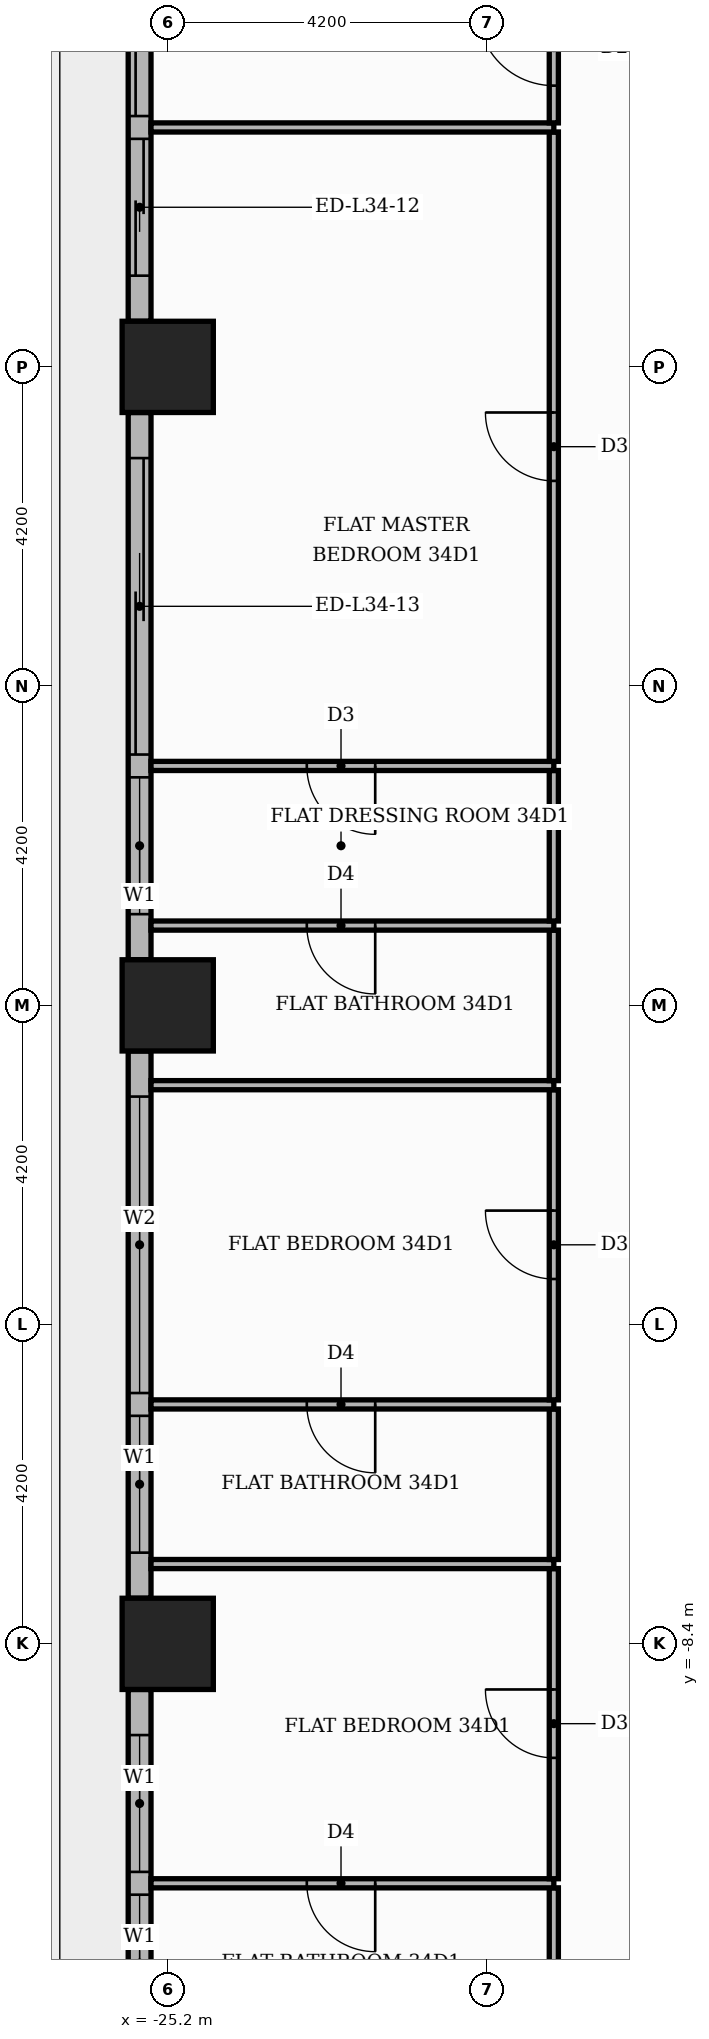
"""IFC4 building model, lengths in metres.
Left out: names, types, materials, properties, quantities, classifications, styles, units other than length and angle.
Written with IfcOpenShell. Run it as: python <this file> out.ifc"""

import sys

from ifc_helpers import new_model, si_unit, direction, frame, frame_2d, origin, origin_2d, place, context, subcontext, project, spatial, rectangle, extrude, element, fill, save


model = new_model("IFC4")
c1 = context("Model", 3, precision=1e-05, world=origin(), true_north=direction((0.0, 1.0)))
c2 = subcontext(c1, "Body", "Model", "MODEL_VIEW")
j1 = project(units=[si_unit("LENGTHUNIT", "METRE"), si_unit("PLANEANGLEUNIT", "RADIAN")], contexts=[c1])
p1 = place(None, origin())
s1 = spatial("IfcSite", under=j1, at=p1, CompositionType="ELEMENT")
p2 = place(p1, origin())
s2 = spatial("IfcBuilding", under=s1, at=p2, CompositionType="ELEMENT")
p3 = place(p2, frame((0.0, 0.0, 145.5)))
s3 = spatial("IfcBuildingStorey", under=s2, at=p3, CompositionType="ELEMENT", Elevation=145.5)
for number, where, z_axis, x_axis in (
    (1, (-25.2, 0.0, 0.0), (0.0, 0.0, 1.0), (1.0, 0.0, 0.0)),
    (2, (-25.2, -8.4, 0.0), (0.0, 0.0, 1.0), (1.0, 0.0, 0.0)),
    (3, (-25.2, 8.4, 0.0), (0.0, 0.0, 1.0), (1.0, 0.0, 0.0)),
):
    element("IfcColumn", number, at=place(p3, frame(where, z_axis=z_axis, x_axis=x_axis)), inside=s3, PredefinedType="COLUMN", context=c2, shape_type="SweptSolid", body=[
        extrude(rectangle(XDim=1.2, YDim=1.2, at=origin_2d()), origin(), (0.0, 0.0, 1.0), 3.9),
    ])
p4 = place(p3, frame((-25.57, 16.2, 0.0), z_axis=(0.0, 0.0, 1.0), x_axis=(0.0, -1.0, 0.0)))
e4 = element("IfcWall", 4, at=p4, inside=s3, PredefinedType="STANDARD", context=c2, shape_type="SweptSolid", body=[
    extrude(rectangle(XDim=7.2, YDim=0.3, at=frame_2d((3.6, 0.0))), origin(), (0.0, 0.0, 1.0), 3.48),
])
p5 = place(p4, frame((0.6, 0.0, 0.0)))
e5 = element("IfcOpeningElement", 5, at=p5, cuts=e4, PredefinedType="OPENING", context=c2, shape_type="SweptSolid", body=[
    extrude(rectangle(XDim=3.9, YDim=2.4, at=frame_2d((1.95, 1.2))), frame((0.0, 0.16, 0.0), z_axis=(0.0, -1.0, 0.0), x_axis=(1.0, 0.0, 0.0)), (0.0, 0.0, 1.0), 0.32),
])
p6 = place(p4, frame((4.8, 0.0, 0.0)))
e6 = element("IfcOpeningElement", 6, at=p6, cuts=e4, PredefinedType="OPENING", context=c2, shape_type="SweptSolid", body=[
    extrude(rectangle(XDim=1.8, YDim=2.4, at=frame_2d((0.9, 1.2))), frame((0.0, 0.16, 0.0), z_axis=(0.0, -1.0, 0.0), x_axis=(1.0, 0.0, 0.0)), (0.0, 0.0, 1.0), 0.32),
])
p7 = place(p3, frame((-25.57, 7.8, 0.0), z_axis=(0.0, 0.0, 1.0), x_axis=(0.0, -1.0, 0.0)))
e7 = element("IfcWall", 7, at=p7, inside=s3, PredefinedType="STANDARD", context=c2, shape_type="SweptSolid", body=[
    extrude(rectangle(XDim=7.2, YDim=0.3, at=frame_2d((3.6, 0.0))), origin(), (0.0, 0.0, 1.0), 3.48),
])
p8 = place(p7, frame((0.6, 0.0, 0.0)))
e8 = element("IfcOpeningElement", 8, at=p8, cuts=e7, PredefinedType="OPENING", context=c2, shape_type="SweptSolid", body=[
    extrude(rectangle(XDim=3.9, YDim=2.4, at=frame_2d((1.95, 1.2))), frame((0.0, 0.16, 0.0), z_axis=(0.0, -1.0, 0.0), x_axis=(1.0, 0.0, 0.0)), (0.0, 0.0, 1.0), 0.32),
])
p9 = place(p7, frame((4.8, 0.0, 0.9)))
e9 = element("IfcOpeningElement", 9, at=p9, cuts=e7, PredefinedType="OPENING", context=c2, shape_type="SweptSolid", body=[
    extrude(rectangle(XDim=1.8, YDim=2.1, at=frame_2d((0.9, 1.05))), frame((0.0, 0.16, 0.0), z_axis=(0.0, -1.0, 0.0), x_axis=(1.0, 0.0, 0.0)), (0.0, 0.0, 1.0), 0.32),
])
p10 = place(p3, frame((-25.57, -0.6, 0.0), z_axis=(0.0, 0.0, 1.0), x_axis=(0.0, -1.0, 0.0)))
e10 = element("IfcWall", 10, at=p10, inside=s3, PredefinedType="STANDARD", context=c2, shape_type="SweptSolid", body=[
    extrude(rectangle(XDim=7.2, YDim=0.3, at=frame_2d((3.6, 0.0))), origin(), (0.0, 0.0, 1.0), 3.48),
])
p11 = place(p10, frame((0.6, 0.0, 0.9)))
e11 = element("IfcOpeningElement", 11, at=p11, cuts=e10, PredefinedType="OPENING", context=c2, shape_type="SweptSolid", body=[
    extrude(rectangle(XDim=3.9, YDim=2.1, at=frame_2d((1.95, 1.05))), frame((0.0, 0.16, 0.0), z_axis=(0.0, -1.0, 0.0), x_axis=(1.0, 0.0, 0.0)), (0.0, 0.0, 1.0), 0.32),
])
p12 = place(p10, frame((4.8, 0.0, 0.9)))
e12 = element("IfcOpeningElement", 12, at=p12, cuts=e10, PredefinedType="OPENING", context=c2, shape_type="SweptSolid", body=[
    extrude(rectangle(XDim=1.8, YDim=2.1, at=frame_2d((0.9, 1.05))), frame((0.0, 0.16, 0.0), z_axis=(0.0, -1.0, 0.0), x_axis=(1.0, 0.0, 0.0)), (0.0, 0.0, 1.0), 0.32),
])
p13 = place(p3, frame((-25.57, -9.0, 0.0), z_axis=(0.0, 0.0, 1.0), x_axis=(0.0, -1.0, 0.0)))
e13 = element("IfcWall", 13, at=p13, inside=s3, PredefinedType="STANDARD", context=c2, shape_type="SweptSolid", body=[
    extrude(rectangle(XDim=7.2, YDim=0.3, at=frame_2d((3.6, 0.0))), origin(), (0.0, 0.0, 1.0), 3.48),
])
p14 = place(p13, frame((0.6, 0.0, 0.9)))
e14 = element("IfcOpeningElement", 14, at=p14, cuts=e13, PredefinedType="OPENING", context=c2, shape_type="SweptSolid", body=[
    extrude(rectangle(XDim=1.8, YDim=2.1, at=frame_2d((0.9, 1.05))), frame((0.0, 0.16, 0.0), z_axis=(0.0, -1.0, 0.0), x_axis=(1.0, 0.0, 0.0)), (0.0, 0.0, 1.0), 0.32),
])
p15 = place(p13, frame((2.7, 0.0, 0.9)))
e15 = element("IfcOpeningElement", 15, at=p15, cuts=e13, PredefinedType="OPENING", context=c2, shape_type="SweptSolid", body=[
    extrude(rectangle(XDim=1.8, YDim=2.1, at=frame_2d((0.9, 1.05))), frame((0.0, 0.16, 0.0), z_axis=(0.0, -1.0, 0.0), x_axis=(1.0, 0.0, 0.0)), (0.0, 0.0, 1.0), 0.32),
])
p16 = place(p13, frame((4.8, 0.0, 0.9)))
e16 = element("IfcOpeningElement", 16, at=p16, cuts=e13, PredefinedType="OPENING", context=c2, shape_type="SweptSolid", body=[
    extrude(rectangle(XDim=1.8, YDim=2.1, at=frame_2d((0.9, 1.05))), frame((0.0, 0.16, 0.0), z_axis=(0.0, -1.0, 0.0), x_axis=(1.0, 0.0, 0.0)), (0.0, 0.0, 1.0), 0.32),
])
p17 = place(p3, frame((-20.12, -13.55, 0.0), z_axis=(0.0, 0.0, 1.0), x_axis=(0.0, 1.0, 0.0)))
e17 = element("IfcWall", 17, at=p17, inside=s3, PredefinedType="PARTITIONING", context=c2, shape_type="SweptSolid", body=[
    extrude(rectangle(XDim=1.94, YDim=0.12, at=frame_2d((0.97, 0.0))), origin(), (0.0, 0.0, 1.0), 3.48),
])
p18 = place(p3, frame((-25.42, -11.55, 0.0), z_axis=(0.0, 0.0, 1.0), x_axis=(1.0, 0.0, 0.0)))
e18 = element("IfcWall", 18, at=p18, inside=s3, PredefinedType="PARTITIONING", context=c2, shape_type="SweptSolid", body=[
    extrude(rectangle(XDim=5.3, YDim=0.12, at=frame_2d((2.65, 0.0))), origin(), (0.0, 0.0, 1.0), 3.48),
])
p19 = place(p18, frame((2.05, 0.0, 0.0)))
e19 = element("IfcOpeningElement", 19, at=p19, cuts=e18, PredefinedType="OPENING", context=c2, shape_type="SweptSolid", body=[
    extrude(rectangle(XDim=0.9, YDim=2.1, at=frame_2d((0.45, 1.05))), frame((0.0, 0.07, 0.0), z_axis=(0.0, -1.0, 0.0), x_axis=(1.0, 0.0, 0.0)), (0.0, 0.0, 1.0), 0.14),
])
p20 = place(p3, frame((-20.12, -11.49, 0.0), z_axis=(0.0, 0.0, 1.0), x_axis=(0.0, 1.0, 0.0)))
e20 = element("IfcWall", 20, at=p20, inside=s3, PredefinedType="PARTITIONING", context=c2, shape_type="SweptSolid", body=[
    extrude(rectangle(XDim=4.08, YDim=0.12, at=frame_2d((2.04, 0.0))), origin(), (0.0, 0.0, 1.0), 3.48),
])
p21 = place(p20, frame((1.59, 0.0, 0.0)))
e21 = element("IfcOpeningElement", 21, at=p21, cuts=e20, PredefinedType="OPENING", context=c2, shape_type="SweptSolid", body=[
    extrude(rectangle(XDim=0.9, YDim=2.1, at=frame_2d((0.45, 1.05))), frame((0.0, 0.07, 0.0), z_axis=(0.0, -1.0, 0.0), x_axis=(1.0, 0.0, 0.0)), (0.0, 0.0, 1.0), 0.14),
])
p22 = place(p3, frame((-25.42, -7.35, 0.0), z_axis=(0.0, 0.0, 1.0), x_axis=(1.0, 0.0, 0.0)))
e22 = element("IfcWall", 22, at=p22, inside=s3, PredefinedType="PARTITIONING", context=c2, shape_type="SweptSolid", body=[
    extrude(rectangle(XDim=5.3, YDim=0.12, at=frame_2d((2.65, 0.0))), origin(), (0.0, 0.0, 1.0), 3.48),
])
p23 = place(p3, frame((-20.12, -7.29, 0.0), z_axis=(0.0, 0.0, 1.0), x_axis=(0.0, 1.0, 0.0)))
e23 = element("IfcWall", 23, at=p23, inside=s3, PredefinedType="PARTITIONING", context=c2, shape_type="SweptSolid", body=[
    extrude(rectangle(XDim=1.98, YDim=0.12, at=frame_2d((0.99, 0.0))), origin(), (0.0, 0.0, 1.0), 3.48),
])
p24 = place(p3, frame((-25.42, -5.25, 0.0), z_axis=(0.0, 0.0, 1.0), x_axis=(1.0, 0.0, 0.0)))
e24 = element("IfcWall", 24, at=p24, inside=s3, PredefinedType="PARTITIONING", context=c2, shape_type="SweptSolid", body=[
    extrude(rectangle(XDim=5.3, YDim=0.12, at=frame_2d((2.65, 0.0))), origin(), (0.0, 0.0, 1.0), 3.48),
])
p25 = place(p24, frame((2.05, 0.0, 0.0)))
e25 = element("IfcOpeningElement", 25, at=p25, cuts=e24, PredefinedType="OPENING", context=c2, shape_type="SweptSolid", body=[
    extrude(rectangle(XDim=0.9, YDim=2.1, at=frame_2d((0.45, 1.05))), frame((0.0, 0.07, 0.0), z_axis=(0.0, -1.0, 0.0), x_axis=(1.0, 0.0, 0.0)), (0.0, 0.0, 1.0), 0.14),
])
p26 = place(p3, frame((-20.12, -5.19, 0.0), z_axis=(0.0, 0.0, 1.0), x_axis=(0.0, 1.0, 0.0)))
e26 = element("IfcWall", 26, at=p26, inside=s3, PredefinedType="PARTITIONING", context=c2, shape_type="SweptSolid", body=[
    extrude(rectangle(XDim=4.08, YDim=0.12, at=frame_2d((2.04, 0.0))), origin(), (0.0, 0.0, 1.0), 3.48),
])
p27 = place(p26, frame((1.59, 0.0, 0.0)))
e27 = element("IfcOpeningElement", 27, at=p27, cuts=e26, PredefinedType="OPENING", context=c2, shape_type="SweptSolid", body=[
    extrude(rectangle(XDim=0.9, YDim=2.1, at=frame_2d((0.45, 1.05))), frame((0.0, 0.07, 0.0), z_axis=(0.0, -1.0, 0.0), x_axis=(1.0, 0.0, 0.0)), (0.0, 0.0, 1.0), 0.14),
])
p28 = place(p3, frame((-25.42, -1.05, 0.0), z_axis=(0.0, 0.0, 1.0), x_axis=(1.0, 0.0, 0.0)))
e28 = element("IfcWall", 28, at=p28, inside=s3, PredefinedType="PARTITIONING", context=c2, shape_type="SweptSolid", body=[
    extrude(rectangle(XDim=5.3, YDim=0.12, at=frame_2d((2.65, 0.0))), origin(), (0.0, 0.0, 1.0), 3.48),
])
p29 = place(p3, frame((-20.12, -0.99, 0.0), z_axis=(0.0, 0.0, 1.0), x_axis=(0.0, 1.0, 0.0)))
e29 = element("IfcWall", 29, at=p29, inside=s3, PredefinedType="PARTITIONING", context=c2, shape_type="SweptSolid", body=[
    extrude(rectangle(XDim=1.98, YDim=0.12, at=frame_2d((0.99, 0.0))), origin(), (0.0, 0.0, 1.0), 3.48),
])
p30 = place(p3, frame((-25.42, 1.05, 0.0), z_axis=(0.0, 0.0, 1.0), x_axis=(1.0, 0.0, 0.0)))
e30 = element("IfcWall", 30, at=p30, inside=s3, PredefinedType="PARTITIONING", context=c2, shape_type="SweptSolid", body=[
    extrude(rectangle(XDim=5.3, YDim=0.12, at=frame_2d((2.65, 0.0))), origin(), (0.0, 0.0, 1.0), 3.48),
])
p31 = place(p30, frame((2.05, 0.0, 0.0)))
e31 = element("IfcOpeningElement", 31, at=p31, cuts=e30, PredefinedType="OPENING", context=c2, shape_type="SweptSolid", body=[
    extrude(rectangle(XDim=0.9, YDim=2.1, at=frame_2d((0.45, 1.05))), frame((0.0, 0.07, 0.0), z_axis=(0.0, -1.0, 0.0), x_axis=(1.0, 0.0, 0.0)), (0.0, 0.0, 1.0), 0.14),
])
p32 = place(p3, frame((-20.12, 1.11, 0.0), z_axis=(0.0, 0.0, 1.0), x_axis=(0.0, 1.0, 0.0)))
e32 = element("IfcWall", 32, at=p32, inside=s3, PredefinedType="PARTITIONING", context=c2, shape_type="SweptSolid", body=[
    extrude(rectangle(XDim=1.98, YDim=0.12, at=frame_2d((0.99, 0.0))), origin(), (0.0, 0.0, 1.0), 3.48),
])
p33 = place(p3, frame((-25.42, 3.15, 0.0), z_axis=(0.0, 0.0, 1.0), x_axis=(1.0, 0.0, 0.0)))
e33 = element("IfcWall", 33, at=p33, inside=s3, PredefinedType="PARTITIONING", context=c2, shape_type="SweptSolid", body=[
    extrude(rectangle(XDim=5.3, YDim=0.12, at=frame_2d((2.65, 0.0))), origin(), (0.0, 0.0, 1.0), 3.48),
])
p34 = place(p33, frame((2.05, 0.0, 0.0)))
e34 = element("IfcOpeningElement", 34, at=p34, cuts=e33, PredefinedType="OPENING", context=c2, shape_type="SweptSolid", body=[
    extrude(rectangle(XDim=0.9, YDim=2.1, at=frame_2d((0.45, 1.05))), frame((0.0, 0.07, 0.0), z_axis=(0.0, -1.0, 0.0), x_axis=(1.0, 0.0, 0.0)), (0.0, 0.0, 1.0), 0.14),
])
p35 = place(p3, frame((-20.12, 3.21, 0.0), z_axis=(0.0, 0.0, 1.0), x_axis=(0.0, 1.0, 0.0)))
e35 = element("IfcWall", 35, at=p35, inside=s3, PredefinedType="PARTITIONING", context=c2, shape_type="SweptSolid", body=[
    extrude(rectangle(XDim=8.28, YDim=0.12, at=frame_2d((4.14, 0.0))), origin(), (0.0, 0.0, 1.0), 3.48),
])
p36 = place(p35, frame((3.69, 0.0, 0.0)))
e36 = element("IfcOpeningElement", 36, at=p36, cuts=e35, PredefinedType="OPENING", context=c2, shape_type="SweptSolid", body=[
    extrude(rectangle(XDim=0.9, YDim=2.1, at=frame_2d((0.45, 1.05))), frame((0.0, 0.07, 0.0), z_axis=(0.0, -1.0, 0.0), x_axis=(1.0, 0.0, 0.0)), (0.0, 0.0, 1.0), 0.14),
])
p37 = place(p3, frame((-25.42, 11.55, 0.0), z_axis=(0.0, 0.0, 1.0), x_axis=(1.0, 0.0, 0.0)))
e37 = element("IfcWall", 37, at=p37, inside=s3, PredefinedType="PARTITIONING", context=c2, shape_type="SweptSolid", body=[
    extrude(rectangle(XDim=5.3, YDim=0.12, at=frame_2d((2.65, 0.0))), origin(), (0.0, 0.0, 1.0), 3.48),
])
p38 = place(p3, frame((-20.12, 11.61, 0.0), z_axis=(0.0, 0.0, 1.0), x_axis=(0.0, 1.0, 0.0)))
e38 = element("IfcWall", 38, at=p38, inside=s3, PredefinedType="PARTITIONING", context=c2, shape_type="SweptSolid", body=[
    extrude(rectangle(XDim=1.98, YDim=0.12, at=frame_2d((0.99, 0.0))), origin(), (0.0, 0.0, 1.0), 3.48),
])
p39 = place(p38, frame((0.49, 0.0, 0.0)))
e39 = element("IfcOpeningElement", 39, at=p39, cuts=e38, PredefinedType="OPENING", context=c2, shape_type="SweptSolid", body=[
    extrude(rectangle(XDim=1.0, YDim=2.1, at=frame_2d((0.5, 1.05))), frame((0.0, 0.07, 0.0), z_axis=(0.0, -1.0, 0.0), x_axis=(1.0, 0.0, 0.0)), (0.0, 0.0, 1.0), 0.14),
])
p40 = place(p5, origin())
e40 = element("IfcDoor", 40, at=p40, inside=s3, OperationType="SLIDING_TO_LEFT", PredefinedType="DOOR", context=c2, shape_type="SweptSolid", body=[
    extrude(rectangle(XDim=3.9, YDim=2.4, at=frame_2d((1.95, 1.2))), frame((0.0, 0.025, 0.0), z_axis=(0.0, -1.0, 0.0), x_axis=(1.0, 0.0, 0.0)), (0.0, 0.0, 1.0), 0.05),
])
fill(e5, e40)
p41 = place(p6, origin())
e41 = element("IfcDoor", 41, at=p41, inside=s3, OperationType="SLIDING_TO_RIGHT", PredefinedType="DOOR", context=c2, shape_type="SweptSolid", body=[
    extrude(rectangle(XDim=1.8, YDim=2.4, at=frame_2d((0.9, 1.2))), frame((0.0, 0.025, 0.0), z_axis=(0.0, -1.0, 0.0), x_axis=(1.0, 0.0, 0.0)), (0.0, 0.0, 1.0), 0.05),
])
fill(e6, e41)
p42 = place(p8, origin())
e42 = element("IfcDoor", 42, at=p42, inside=s3, OperationType="SLIDING_TO_LEFT", PredefinedType="DOOR", context=c2, shape_type="SweptSolid", body=[
    extrude(rectangle(XDim=3.9, YDim=2.4, at=frame_2d((1.95, 1.2))), frame((0.0, 0.025, 0.0), z_axis=(0.0, -1.0, 0.0), x_axis=(1.0, 0.0, 0.0)), (0.0, 0.0, 1.0), 0.05),
])
fill(e8, e42)
p43 = place(p9, origin())
e43 = element("IfcWindow", 43, at=p43, inside=s3, PartitioningType="SINGLE_PANEL", PredefinedType="WINDOW", context=c2, shape_type="SweptSolid", body=[
    extrude(rectangle(XDim=1.8, YDim=2.1, at=frame_2d((0.9, 1.05))), frame((0.0, 0.03, 0.0), z_axis=(0.0, -1.0, 0.0), x_axis=(1.0, 0.0, 0.0)), (0.0, 0.0, 1.0), 0.06),
])
fill(e9, e43)
p44 = place(p11, origin())
e44 = element("IfcWindow", 44, at=p44, inside=s3, PartitioningType="SINGLE_PANEL", PredefinedType="WINDOW", context=c2, shape_type="SweptSolid", body=[
    extrude(rectangle(XDim=3.9, YDim=2.1, at=frame_2d((1.95, 1.05))), frame((0.0, 0.03, 0.0), z_axis=(0.0, -1.0, 0.0), x_axis=(1.0, 0.0, 0.0)), (0.0, 0.0, 1.0), 0.06),
])
fill(e11, e44)
p45 = place(p12, origin())
e45 = element("IfcWindow", 45, at=p45, inside=s3, PartitioningType="SINGLE_PANEL", PredefinedType="WINDOW", context=c2, shape_type="SweptSolid", body=[
    extrude(rectangle(XDim=1.8, YDim=2.1, at=frame_2d((0.9, 1.05))), frame((0.0, 0.03, 0.0), z_axis=(0.0, -1.0, 0.0), x_axis=(1.0, 0.0, 0.0)), (0.0, 0.0, 1.0), 0.06),
])
fill(e12, e45)
p46 = place(p14, origin())
e46 = element("IfcWindow", 46, at=p46, inside=s3, PartitioningType="SINGLE_PANEL", PredefinedType="WINDOW", context=c2, shape_type="SweptSolid", body=[
    extrude(rectangle(XDim=1.8, YDim=2.1, at=frame_2d((0.9, 1.05))), frame((0.0, 0.03, 0.0), z_axis=(0.0, -1.0, 0.0), x_axis=(1.0, 0.0, 0.0)), (0.0, 0.0, 1.0), 0.06),
])
fill(e14, e46)
p47 = place(p15, origin())
e47 = element("IfcWindow", 47, at=p47, inside=s3, PartitioningType="SINGLE_PANEL", PredefinedType="WINDOW", context=c2, shape_type="SweptSolid", body=[
    extrude(rectangle(XDim=1.8, YDim=2.1, at=frame_2d((0.9, 1.05))), frame((0.0, 0.03, 0.0), z_axis=(0.0, -1.0, 0.0), x_axis=(1.0, 0.0, 0.0)), (0.0, 0.0, 1.0), 0.06),
])
fill(e15, e47)
p48 = place(p39, origin())
e48 = element("IfcDoor", 48, at=p48, inside=s3, OperationType="SINGLE_SWING_RIGHT", PredefinedType="DOOR", context=c2, shape_type="SweptSolid", body=[
    extrude(rectangle(XDim=1.0, YDim=2.1, at=frame_2d((0.5, 1.05))), frame((0.0, 0.025, 0.0), z_axis=(0.0, -1.0, 0.0), x_axis=(1.0, 0.0, 0.0)), (0.0, 0.0, 1.0), 0.05),
])
fill(e39, e48)
p49 = place(p36, origin())
e49 = element("IfcDoor", 49, at=p49, inside=s3, OperationType="SINGLE_SWING_RIGHT", PredefinedType="DOOR", context=c2, shape_type="SweptSolid", body=[
    extrude(rectangle(XDim=0.9, YDim=2.1, at=frame_2d((0.45, 1.05))), frame((0.0, 0.025, 0.0), z_axis=(0.0, -1.0, 0.0), x_axis=(1.0, 0.0, 0.0)), (0.0, 0.0, 1.0), 0.05),
])
fill(e36, e49)
p50 = place(p34, frame((0.9, 0.0, 0.0), z_axis=(0.0, 0.0, 1.0), x_axis=(-1.0, 0.0, 0.0)))
e50 = element("IfcDoor", 50, at=p50, inside=s3, OperationType="SINGLE_SWING_RIGHT", PredefinedType="DOOR", context=c2, shape_type="SweptSolid", body=[
    extrude(rectangle(XDim=0.9, YDim=2.1, at=frame_2d((0.45, 1.05))), frame((0.0, 0.025, 0.0), z_axis=(0.0, -1.0, 0.0), x_axis=(1.0, 0.0, 0.0)), (0.0, 0.0, 1.0), 0.05),
])
fill(e34, e50)
p51 = place(p31, frame((0.9, 0.0, 0.0), z_axis=(0.0, 0.0, 1.0), x_axis=(-1.0, 0.0, 0.0)))
e51 = element("IfcDoor", 51, at=p51, inside=s3, OperationType="SINGLE_SWING_RIGHT", PredefinedType="DOOR", context=c2, shape_type="SweptSolid", body=[
    extrude(rectangle(XDim=0.9, YDim=2.1, at=frame_2d((0.45, 1.05))), frame((0.0, 0.025, 0.0), z_axis=(0.0, -1.0, 0.0), x_axis=(1.0, 0.0, 0.0)), (0.0, 0.0, 1.0), 0.05),
])
fill(e31, e51)
p52 = place(p27, origin())
e52 = element("IfcDoor", 52, at=p52, inside=s3, OperationType="SINGLE_SWING_RIGHT", PredefinedType="DOOR", context=c2, shape_type="SweptSolid", body=[
    extrude(rectangle(XDim=0.9, YDim=2.1, at=frame_2d((0.45, 1.05))), frame((0.0, 0.025, 0.0), z_axis=(0.0, -1.0, 0.0), x_axis=(1.0, 0.0, 0.0)), (0.0, 0.0, 1.0), 0.05),
])
fill(e27, e52)
p53 = place(p25, frame((0.9, 0.0, 0.0), z_axis=(0.0, 0.0, 1.0), x_axis=(-1.0, 0.0, 0.0)))
e53 = element("IfcDoor", 53, at=p53, inside=s3, OperationType="SINGLE_SWING_RIGHT", PredefinedType="DOOR", context=c2, shape_type="SweptSolid", body=[
    extrude(rectangle(XDim=0.9, YDim=2.1, at=frame_2d((0.45, 1.05))), frame((0.0, 0.025, 0.0), z_axis=(0.0, -1.0, 0.0), x_axis=(1.0, 0.0, 0.0)), (0.0, 0.0, 1.0), 0.05),
])
fill(e25, e53)
p54 = place(p21, origin())
e54 = element("IfcDoor", 54, at=p54, inside=s3, OperationType="SINGLE_SWING_RIGHT", PredefinedType="DOOR", context=c2, shape_type="SweptSolid", body=[
    extrude(rectangle(XDim=0.9, YDim=2.1, at=frame_2d((0.45, 1.05))), frame((0.0, 0.025, 0.0), z_axis=(0.0, -1.0, 0.0), x_axis=(1.0, 0.0, 0.0)), (0.0, 0.0, 1.0), 0.05),
])
fill(e21, e54)
p55 = place(p19, frame((0.9, 0.0, 0.0), z_axis=(0.0, 0.0, 1.0), x_axis=(-1.0, 0.0, 0.0)))
e55 = element("IfcDoor", 55, at=p55, inside=s3, OperationType="SINGLE_SWING_RIGHT", PredefinedType="DOOR", context=c2, shape_type="SweptSolid", body=[
    extrude(rectangle(XDim=0.9, YDim=2.1, at=frame_2d((0.45, 1.05))), frame((0.0, 0.025, 0.0), z_axis=(0.0, -1.0, 0.0), x_axis=(1.0, 0.0, 0.0)), (0.0, 0.0, 1.0), 0.05),
])
fill(e19, e55)
save(model, sys.argv[1])
